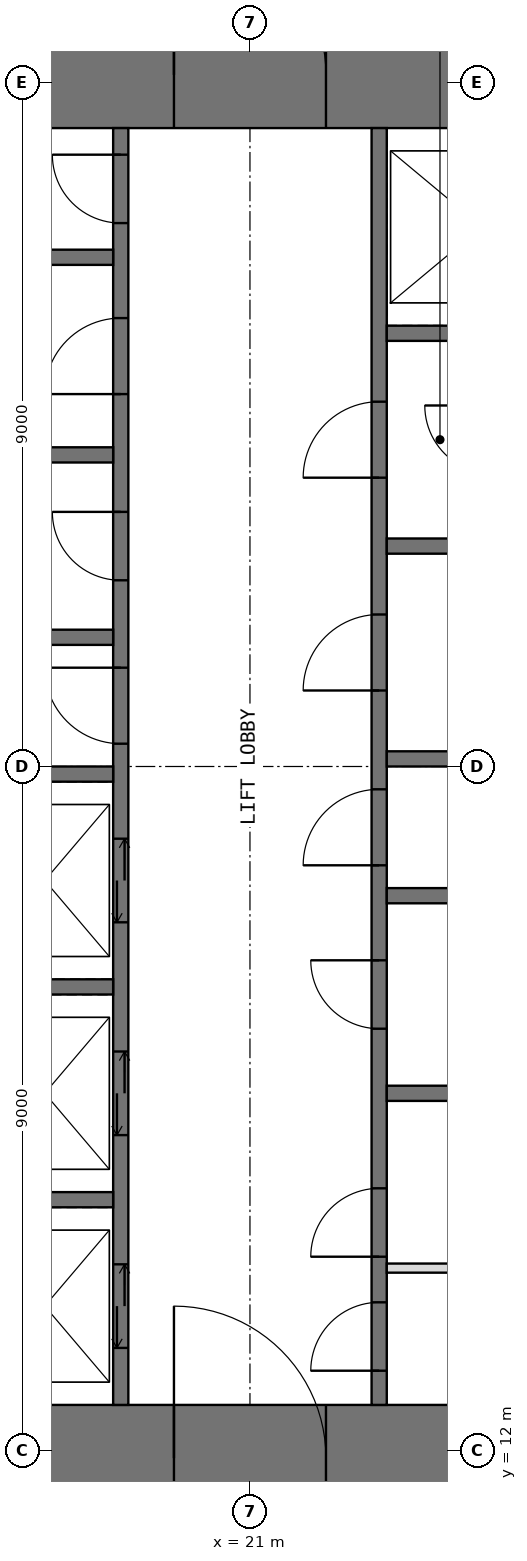
"""IFC4 building model, lengths in metres.
Left out: names, types, materials, properties, quantities, classifications, styles, units other than length and angle.
Written with IfcOpenShell. Run it as: python <this file> out.ifc"""

import sys

from ifc_helpers import new_model, si_unit, direction, frame, frame_2d, origin, place, context, subcontext, project, spatial, rectangle, extrude, element, fill, save


model = new_model("IFC4")
c1 = context("Model", 3, precision=1e-05, world=origin(), true_north=direction((0.0, 1.0)))
c2 = subcontext(c1, "Body", "Model", "MODEL_VIEW")
j1 = project(units=[si_unit("LENGTHUNIT", "METRE"), si_unit("PLANEANGLEUNIT", "RADIAN")], contexts=[c1])
p1 = place(None, origin())
s1 = spatial("IfcSite", under=j1, at=p1, CompositionType="ELEMENT")
p2 = place(p1, origin())
s2 = spatial("IfcBuilding", under=s1, at=p2, CompositionType="ELEMENT")
p3 = place(p2, frame((0.0, 0.0, 210.5)))
s3 = spatial("IfcBuildingStorey", under=s2, at=p3, CompositionType="ELEMENT", Elevation=210.5)
p4 = place(p3, frame((11.2, 11.9, -0.05), z_axis=(0.0, 0.0, 1.0), x_axis=(1.0, 0.0, 0.0)))
e1 = element("IfcWall", 1, at=p4, inside=s3, PredefinedType="SHEAR", context=c2, shape_type="SweptSolid", body=[
    extrude(rectangle(XDim=19.6, YDim=1.4, at=frame_2d((9.8, 0.0))), origin(), (0.0, 0.0, 1.0), 4.0),
])
p5 = place(p4, frame((8.8, 0.0, 0.05)))
e2 = element("IfcOpeningElement", 2, at=p5, cuts=e1, PredefinedType="OPENING", context=c2, shape_type="SweptSolid", body=[
    extrude(rectangle(XDim=2.0, YDim=2.2, at=frame_2d((1.0, 1.1))), frame((0.0, 0.71, 0.0), z_axis=(0.0, -1.0, 0.0), x_axis=(1.0, 0.0, 0.0)), (0.0, 0.0, 1.0), 1.42),
])
p6 = place(p3, frame((11.2, 30.1, -0.05), z_axis=(0.0, 0.0, 1.0), x_axis=(1.0, 0.0, 0.0)))
e3 = element("IfcWall", 3, at=p6, inside=s3, PredefinedType="SHEAR", context=c2, shape_type="SweptSolid", body=[
    extrude(rectangle(XDim=19.6, YDim=1.4, at=frame_2d((9.8, 0.0))), origin(), (0.0, 0.0, 1.0), 4.0),
])
p7 = place(p6, frame((8.8, 0.0, 0.05)))
e4 = element("IfcOpeningElement", 4, at=p7, cuts=e3, PredefinedType="OPENING", context=c2, shape_type="SweptSolid", body=[
    extrude(rectangle(XDim=2.0, YDim=2.2, at=frame_2d((1.0, 1.1))), frame((0.0, 0.71, 0.0), z_axis=(0.0, -1.0, 0.0), x_axis=(1.0, 0.0, 0.0)), (0.0, 0.0, 1.0), 1.42),
])
p8 = place(p3, frame((19.3, 12.6, -0.05), z_axis=(0.0, 0.0, 1.0), x_axis=(0.0, 1.0, 0.0)))
e5 = element("IfcWall", 5, at=p8, inside=s3, PredefinedType="SHEAR", context=c2, shape_type="SweptSolid", body=[
    extrude(rectangle(XDim=16.8, YDim=0.2, at=frame_2d((8.4, 0.0))), origin(), (0.0, 0.0, 1.0), 4.0),
])
p9 = place(p8, frame((8.7, 0.0, 0.05)))
e6 = element("IfcOpeningElement", 6, at=p9, cuts=e5, PredefinedType="OPENING", context=c2, shape_type="SweptSolid", body=[
    extrude(rectangle(XDim=1.0, YDim=2.2, at=frame_2d((0.5, 1.1))), frame((0.0, 0.11, 0.0), z_axis=(0.0, -1.0, 0.0), x_axis=(1.0, 0.0, 0.0)), (0.0, 0.0, 1.0), 0.22),
])
p10 = place(p8, frame((10.85, 0.0, 0.05)))
e7 = element("IfcOpeningElement", 7, at=p10, cuts=e5, PredefinedType="OPENING", context=c2, shape_type="SweptSolid", body=[
    extrude(rectangle(XDim=0.9, YDim=2.2, at=frame_2d((0.45, 1.1))), frame((0.0, 0.11, 0.0), z_axis=(0.0, -1.0, 0.0), x_axis=(1.0, 0.0, 0.0)), (0.0, 0.0, 1.0), 0.22),
])
p11 = place(p8, frame((13.3, 0.0, 0.05)))
e8 = element("IfcOpeningElement", 8, at=p11, cuts=e5, PredefinedType="OPENING", context=c2, shape_type="SweptSolid", body=[
    extrude(rectangle(XDim=1.0, YDim=2.2, at=frame_2d((0.5, 1.1))), frame((0.0, 0.11, 0.0), z_axis=(0.0, -1.0, 0.0), x_axis=(1.0, 0.0, 0.0)), (0.0, 0.0, 1.0), 0.22),
])
p12 = place(p8, frame((15.55, 0.0, 0.05)))
e9 = element("IfcOpeningElement", 9, at=p12, cuts=e5, PredefinedType="OPENING", context=c2, shape_type="SweptSolid", body=[
    extrude(rectangle(XDim=0.9, YDim=2.2, at=frame_2d((0.45, 1.1))), frame((0.0, 0.11, 0.0), z_axis=(0.0, -1.0, 0.0), x_axis=(1.0, 0.0, 0.0)), (0.0, 0.0, 1.0), 0.22),
])
p13 = place(p8, frame((0.75, 0.0, 0.05)))
e10 = element("IfcOpeningElement", 10, at=p13, cuts=e5, PredefinedType="OPENING", context=c2, shape_type="SweptSolid", body=[
    extrude(rectangle(XDim=1.1, YDim=2.2, at=frame_2d((0.55, 1.1))), frame((0.0, 0.11, 0.0), z_axis=(0.0, -1.0, 0.0), x_axis=(1.0, 0.0, 0.0)), (0.0, 0.0, 1.0), 0.22),
])
p14 = place(p8, frame((3.55, 0.0, 0.05)))
e11 = element("IfcOpeningElement", 11, at=p14, cuts=e5, PredefinedType="OPENING", context=c2, shape_type="SweptSolid", body=[
    extrude(rectangle(XDim=1.1, YDim=2.2, at=frame_2d((0.55, 1.1))), frame((0.0, 0.11, 0.0), z_axis=(0.0, -1.0, 0.0), x_axis=(1.0, 0.0, 0.0)), (0.0, 0.0, 1.0), 0.22),
])
p15 = place(p8, frame((6.35, 0.0, 0.05)))
e12 = element("IfcOpeningElement", 12, at=p15, cuts=e5, PredefinedType="OPENING", context=c2, shape_type="SweptSolid", body=[
    extrude(rectangle(XDim=1.1, YDim=2.2, at=frame_2d((0.55, 1.1))), frame((0.0, 0.11, 0.0), z_axis=(0.0, -1.0, 0.0), x_axis=(1.0, 0.0, 0.0)), (0.0, 0.0, 1.0), 0.22),
])
p16 = place(p3, frame((22.7, 12.6, -0.05), z_axis=(0.0, 0.0, 1.0), x_axis=(0.0, 1.0, 0.0)))
e13 = element("IfcWall", 13, at=p16, inside=s3, PredefinedType="SHEAR", context=c2, shape_type="SweptSolid", body=[
    extrude(rectangle(XDim=16.8, YDim=0.2, at=frame_2d((8.4, 0.0))), origin(), (0.0, 0.0, 1.0), 4.0),
])
p17 = place(p16, frame((0.45, 0.0, 0.05)))
e14 = element("IfcOpeningElement", 14, at=p17, cuts=e13, PredefinedType="OPENING", context=c2, shape_type="SweptSolid", body=[
    extrude(rectangle(XDim=0.9, YDim=2.2, at=frame_2d((0.45, 1.1))), frame((0.0, 0.11, 0.0), z_axis=(0.0, -1.0, 0.0), x_axis=(1.0, 0.0, 0.0)), (0.0, 0.0, 1.0), 0.22),
])
p18 = place(p16, frame((7.1, 0.0, 0.05)))
e15 = element("IfcOpeningElement", 15, at=p18, cuts=e13, PredefinedType="OPENING", context=c2, shape_type="SweptSolid", body=[
    extrude(rectangle(XDim=1.0, YDim=2.2, at=frame_2d((0.5, 1.1))), frame((0.0, 0.11, 0.0), z_axis=(0.0, -1.0, 0.0), x_axis=(1.0, 0.0, 0.0)), (0.0, 0.0, 1.0), 0.22),
])
p19 = place(p16, frame((1.95, 0.0, 0.05)))
e16 = element("IfcOpeningElement", 16, at=p19, cuts=e13, PredefinedType="OPENING", context=c2, shape_type="SweptSolid", body=[
    extrude(rectangle(XDim=0.9, YDim=2.2, at=frame_2d((0.45, 1.1))), frame((0.0, 0.11, 0.0), z_axis=(0.0, -1.0, 0.0), x_axis=(1.0, 0.0, 0.0)), (0.0, 0.0, 1.0), 0.22),
])
p20 = place(p16, frame((4.95, 0.0, 0.05)))
e17 = element("IfcOpeningElement", 17, at=p20, cuts=e13, PredefinedType="OPENING", context=c2, shape_type="SweptSolid", body=[
    extrude(rectangle(XDim=0.9, YDim=2.2, at=frame_2d((0.45, 1.1))), frame((0.0, 0.11, 0.0), z_axis=(0.0, -1.0, 0.0), x_axis=(1.0, 0.0, 0.0)), (0.0, 0.0, 1.0), 0.22),
])
p21 = place(p16, frame((9.4, 0.0, 0.05)))
e18 = element("IfcOpeningElement", 18, at=p21, cuts=e13, PredefinedType="OPENING", context=c2, shape_type="SweptSolid", body=[
    extrude(rectangle(XDim=1.0, YDim=2.2, at=frame_2d((0.5, 1.1))), frame((0.0, 0.11, 0.0), z_axis=(0.0, -1.0, 0.0), x_axis=(1.0, 0.0, 0.0)), (0.0, 0.0, 1.0), 0.22),
])
p22 = place(p16, frame((12.2, 0.0, 0.05)))
e19 = element("IfcOpeningElement", 19, at=p22, cuts=e13, PredefinedType="OPENING", context=c2, shape_type="SweptSolid", body=[
    extrude(rectangle(XDim=1.0, YDim=2.2, at=frame_2d((0.5, 1.1))), frame((0.0, 0.11, 0.0), z_axis=(0.0, -1.0, 0.0), x_axis=(1.0, 0.0, 0.0)), (0.0, 0.0, 1.0), 0.22),
])
for number, where, z_axis, x_axis in (
    (20, (16.0, 15.3, -0.05), (0.0, 0.0, 1.0), (1.0, 0.0, 0.0)),
    (21, (16.0, 18.1, -0.05), (0.0, 0.0, 1.0), (1.0, 0.0, 0.0)),
    (22, (16.0, 20.9, -0.05), (0.0, 0.0, 1.0), (1.0, 0.0, 0.0)),
    (23, (16.0, 22.7, -0.05), (0.0, 0.0, 1.0), (1.0, 0.0, 0.0)),
    (24, (16.0, 25.1, -0.05), (0.0, 0.0, 1.0), (1.0, 0.0, 0.0)),
    (25, (16.0, 27.7, -0.05), (0.0, 0.0, 1.0), (1.0, 0.0, 0.0)),
    (26, (22.8, 16.7, -0.05), (0.0, 0.0, 1.0), (1.0, 0.0, 0.0)),
    (27, (22.8, 19.3, -0.05), (0.0, 0.0, 1.0), (1.0, 0.0, 0.0)),
    (28, (22.8, 21.1, -0.05), (0.0, 0.0, 1.0), (1.0, 0.0, 0.0)),
    (29, (22.8, 23.9, -0.05), (0.0, 0.0, 1.0), (1.0, 0.0, 0.0)),
    (30, (22.8, 26.7, -0.05), (0.0, 0.0, 1.0), (1.0, 0.0, 0.0)),
):
    element("IfcWall", number, at=place(p3, frame(where, z_axis=z_axis, x_axis=x_axis)), inside=s3, PredefinedType="SHEAR", context=c2, shape_type="SweptSolid", body=[
        extrude(rectangle(XDim=3.2, YDim=0.2, at=frame_2d((1.6, 0.0))), origin(), (0.0, 0.0, 1.0), 4.0),
    ])
p23 = place(p3, frame((22.8, 14.4, 0.0), z_axis=(0.0, 0.0, 1.0), x_axis=(1.0, 0.0, 0.0)))
e31 = element("IfcWall", 31, at=p23, inside=s3, PredefinedType="PARTITIONING", context=c2, shape_type="SweptSolid", body=[
    extrude(rectangle(XDim=3.2, YDim=0.12, at=frame_2d((1.6, 0.0))), origin(), (0.0, 0.0, 1.0), 3.75),
])
p24 = place(p5, origin())
e32 = element("IfcDoor", 32, at=p24, inside=s3, OperationType="DOUBLE_DOOR_SINGLE_SWING", PredefinedType="DOOR", context=c2, shape_type="SweptSolid", body=[
    extrude(rectangle(XDim=2.0, YDim=2.2, at=frame_2d((1.0, 1.1))), frame((0.0, 0.025, 0.0), z_axis=(0.0, -1.0, 0.0), x_axis=(1.0, 0.0, 0.0)), (0.0, 0.0, 1.0), 0.05),
])
fill(e2, e32)
p25 = place(p7, origin())
e33 = element("IfcDoor", 33, at=p25, inside=s3, OperationType="DOUBLE_DOOR_SINGLE_SWING", PredefinedType="DOOR", context=c2, shape_type="SweptSolid", body=[
    extrude(rectangle(XDim=2.0, YDim=2.2, at=frame_2d((1.0, 1.1))), frame((0.0, 0.025, 0.0), z_axis=(0.0, -1.0, 0.0), x_axis=(1.0, 0.0, 0.0)), (0.0, 0.0, 1.0), 0.05),
])
fill(e4, e33)
p26 = place(p17, origin())
e34 = element("IfcDoor", 34, at=p26, inside=s3, OperationType="SINGLE_SWING_LEFT", PredefinedType="DOOR", context=c2, shape_type="SweptSolid", body=[
    extrude(rectangle(XDim=0.9, YDim=2.2, at=frame_2d((0.45, 1.1))), frame((0.0, 0.025, 0.0), z_axis=(0.0, -1.0, 0.0), x_axis=(1.0, 0.0, 0.0)), (0.0, 0.0, 1.0), 0.05),
])
fill(e14, e34)
p27 = place(p9, origin())
e35 = element("IfcDoor", 35, at=p27, inside=s3, OperationType="SINGLE_SWING_RIGHT", PredefinedType="DOOR", context=c2, shape_type="SweptSolid", body=[
    extrude(rectangle(XDim=1.0, YDim=2.2, at=frame_2d((0.5, 1.1))), frame((0.0, 0.025, 0.0), z_axis=(0.0, -1.0, 0.0), x_axis=(1.0, 0.0, 0.0)), (0.0, 0.0, 1.0), 0.05),
])
fill(e6, e35)
p28 = place(p18, origin())
e36 = element("IfcDoor", 36, at=p28, inside=s3, OperationType="SINGLE_SWING_LEFT", PredefinedType="DOOR", context=c2, shape_type="SweptSolid", body=[
    extrude(rectangle(XDim=1.0, YDim=2.2, at=frame_2d((0.5, 1.1))), frame((0.0, 0.025, 0.0), z_axis=(0.0, -1.0, 0.0), x_axis=(1.0, 0.0, 0.0)), (0.0, 0.0, 1.0), 0.05),
])
fill(e15, e36)
p29 = place(p10, origin())
e37 = element("IfcDoor", 37, at=p29, inside=s3, OperationType="SINGLE_SWING_RIGHT", PredefinedType="DOOR", context=c2, shape_type="SweptSolid", body=[
    extrude(rectangle(XDim=0.9, YDim=2.2, at=frame_2d((0.45, 1.1))), frame((0.0, 0.025, 0.0), z_axis=(0.0, -1.0, 0.0), x_axis=(1.0, 0.0, 0.0)), (0.0, 0.0, 1.0), 0.05),
])
fill(e7, e37)
p30 = place(p11, origin())
e38 = element("IfcDoor", 38, at=p30, inside=s3, OperationType="SINGLE_SWING_LEFT", PredefinedType="DOOR", context=c2, shape_type="SweptSolid", body=[
    extrude(rectangle(XDim=1.0, YDim=2.2, at=frame_2d((0.5, 1.1))), frame((0.0, 0.025, 0.0), z_axis=(0.0, -1.0, 0.0), x_axis=(1.0, 0.0, 0.0)), (0.0, 0.0, 1.0), 0.05),
])
fill(e8, e38)
p31 = place(p12, origin())
e39 = element("IfcDoor", 39, at=p31, inside=s3, OperationType="SINGLE_SWING_RIGHT", PredefinedType="DOOR", context=c2, shape_type="SweptSolid", body=[
    extrude(rectangle(XDim=0.9, YDim=2.2, at=frame_2d((0.45, 1.1))), frame((0.0, 0.025, 0.0), z_axis=(0.0, -1.0, 0.0), x_axis=(1.0, 0.0, 0.0)), (0.0, 0.0, 1.0), 0.05),
])
fill(e9, e39)
p32 = place(p19, origin())
e40 = element("IfcDoor", 40, at=p32, inside=s3, OperationType="SINGLE_SWING_LEFT", PredefinedType="DOOR", context=c2, shape_type="SweptSolid", body=[
    extrude(rectangle(XDim=0.9, YDim=2.2, at=frame_2d((0.45, 1.1))), frame((0.0, 0.025, 0.0), z_axis=(0.0, -1.0, 0.0), x_axis=(1.0, 0.0, 0.0)), (0.0, 0.0, 1.0), 0.05),
])
fill(e16, e40)
p33 = place(p20, origin())
e41 = element("IfcDoor", 41, at=p33, inside=s3, OperationType="SINGLE_SWING_RIGHT", PredefinedType="DOOR", context=c2, shape_type="SweptSolid", body=[
    extrude(rectangle(XDim=0.9, YDim=2.2, at=frame_2d((0.45, 1.1))), frame((0.0, 0.025, 0.0), z_axis=(0.0, -1.0, 0.0), x_axis=(1.0, 0.0, 0.0)), (0.0, 0.0, 1.0), 0.05),
])
fill(e17, e41)
p34 = place(p21, origin())
e42 = element("IfcDoor", 42, at=p34, inside=s3, OperationType="SINGLE_SWING_LEFT", PredefinedType="DOOR", context=c2, shape_type="SweptSolid", body=[
    extrude(rectangle(XDim=1.0, YDim=2.2, at=frame_2d((0.5, 1.1))), frame((0.0, 0.025, 0.0), z_axis=(0.0, -1.0, 0.0), x_axis=(1.0, 0.0, 0.0)), (0.0, 0.0, 1.0), 0.05),
])
fill(e18, e42)
p35 = place(p22, origin())
e43 = element("IfcDoor", 43, at=p35, inside=s3, OperationType="SINGLE_SWING_LEFT", PredefinedType="DOOR", context=c2, shape_type="SweptSolid", body=[
    extrude(rectangle(XDim=1.0, YDim=2.2, at=frame_2d((0.5, 1.1))), frame((0.0, 0.025, 0.0), z_axis=(0.0, -1.0, 0.0), x_axis=(1.0, 0.0, 0.0)), (0.0, 0.0, 1.0), 0.05),
])
fill(e19, e43)
p36 = place(p13, origin())
e44 = element("IfcDoor", 44, at=p36, inside=s3, OperationType="DOUBLE_DOOR_SLIDING", PredefinedType="DOOR", context=c2, shape_type="SweptSolid", body=[
    extrude(rectangle(XDim=1.1, YDim=2.2, at=frame_2d((0.55, 1.1))), frame((0.0, 0.025, 0.0), z_axis=(0.0, -1.0, 0.0), x_axis=(1.0, 0.0, 0.0)), (0.0, 0.0, 1.0), 0.05),
])
fill(e10, e44)
p37 = place(p14, origin())
e45 = element("IfcDoor", 45, at=p37, inside=s3, OperationType="DOUBLE_DOOR_SLIDING", PredefinedType="DOOR", context=c2, shape_type="SweptSolid", body=[
    extrude(rectangle(XDim=1.1, YDim=2.2, at=frame_2d((0.55, 1.1))), frame((0.0, 0.025, 0.0), z_axis=(0.0, -1.0, 0.0), x_axis=(1.0, 0.0, 0.0)), (0.0, 0.0, 1.0), 0.05),
])
fill(e11, e45)
p38 = place(p15, origin())
e46 = element("IfcDoor", 46, at=p38, inside=s3, OperationType="DOUBLE_DOOR_SLIDING", PredefinedType="DOOR", context=c2, shape_type="SweptSolid", body=[
    extrude(rectangle(XDim=1.1, YDim=2.2, at=frame_2d((0.55, 1.1))), frame((0.0, 0.025, 0.0), z_axis=(0.0, -1.0, 0.0), x_axis=(1.0, 0.0, 0.0)), (0.0, 0.0, 1.0), 0.05),
])
fill(e12, e46)
save(model, sys.argv[1])
